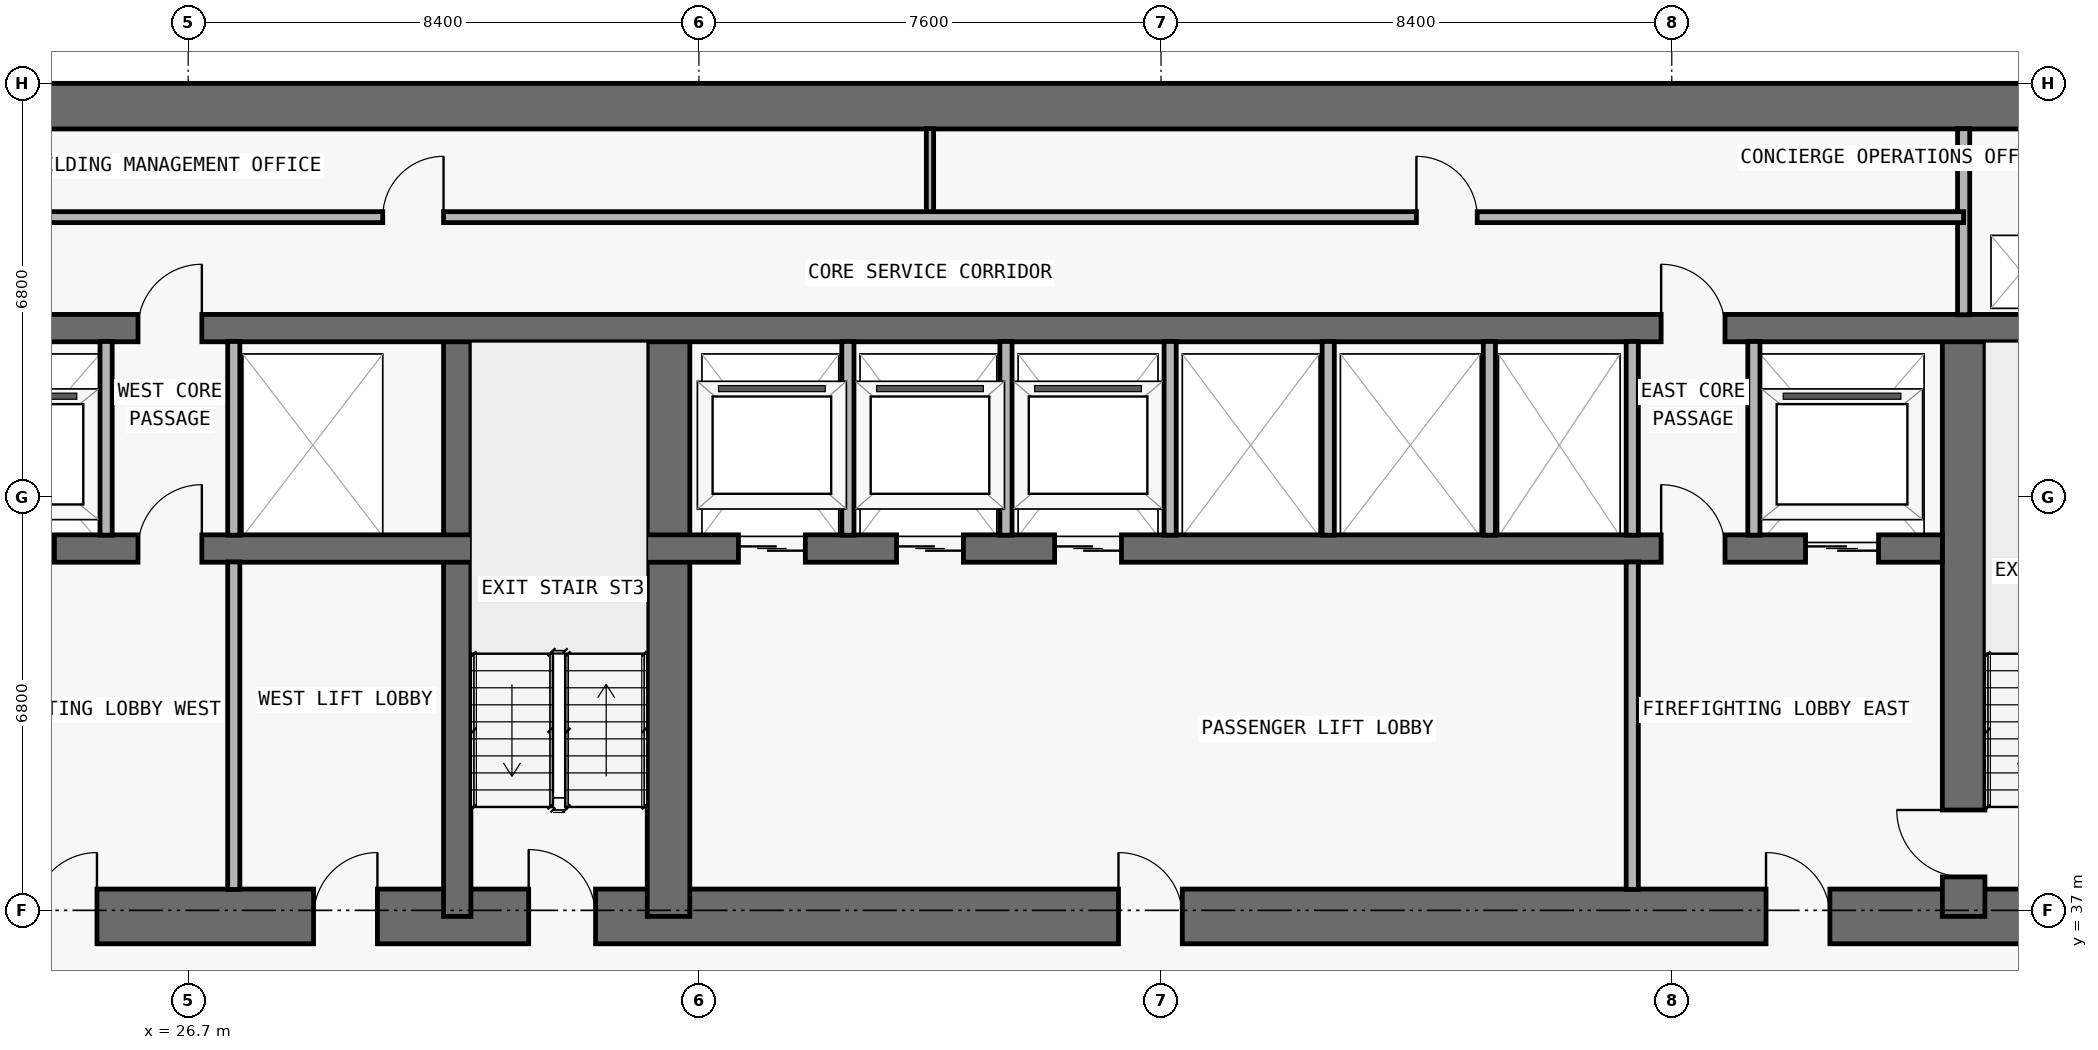
"""IFC4 building model, lengths in metres.
Left out: names, types, materials, properties, quantities, classifications, styles, units other than length and angle.
Written with IfcOpenShell. Run it as: python <this file> out.ifc"""

import sys

from ifc_helpers import new_model, si_unit, direction, frame, frame_2d, origin, place, context, subcontext, project, spatial, rectangle, extrude, element, fill, save


model = new_model("IFC4")
c1 = context("Model", 3, precision=1e-05, world=origin(), true_north=direction((0.0, 1.0)))
c2 = subcontext(c1, "Body", "Model", "MODEL_VIEW")
j1 = project(units=[si_unit("LENGTHUNIT", "METRE"), si_unit("PLANEANGLEUNIT", "RADIAN")], contexts=[c1])
p1 = place(None, origin())
s1 = spatial("IfcSite", under=j1, at=p1, CompositionType="ELEMENT")
p2 = place(p1, origin())
s2 = spatial("IfcBuilding", under=s1, at=p2, CompositionType="ELEMENT")
p3 = place(p2, frame((0.0, 0.0, 53.1)))
s3 = spatial("IfcBuildingStorey", under=s2, at=p3, CompositionType="ELEMENT", Elevation=53.1)
p4 = place(p3, frame((17.75, 36.9, 0.0), z_axis=(0.0, 0.0, 1.0), x_axis=(1.0, 0.0, 0.0)))
e1 = element("IfcWall", 1, at=p4, inside=s3, PredefinedType="SHEAR", context=c2, shape_type="SweptSolid", body=[
    extrude(rectangle(XDim=42.3, YDim=0.9, at=frame_2d((21.15, 0.0))), origin(), (0.0, 0.0, 1.0), 3.05),
])
p5 = place(p4, frame((14.55, 0.0, 0.0)))
e2 = element("IfcOpeningElement", 2, at=p5, cuts=e1, PredefinedType="OPENING", context=c2, shape_type="SweptSolid", body=[
    extrude(rectangle(XDim=1.1, YDim=2.15, at=frame_2d((0.55, 1.075))), frame((0.0, 0.46, 0.0), z_axis=(0.0, -1.0, 0.0), x_axis=(1.0, 0.0, 0.0)), (0.0, 0.0, 1.0), 0.92),
])
p6 = place(p4, frame((6.4, 0.0, 0.0)))
e3 = element("IfcOpeningElement", 3, at=p6, cuts=e1, PredefinedType="OPENING", context=c2, shape_type="SweptSolid", body=[
    extrude(rectangle(XDim=1.05, YDim=2.15, at=frame_2d((0.525, 1.075))), frame((0.0, 0.46, 0.0), z_axis=(0.0, -1.0, 0.0), x_axis=(1.0, 0.0, 0.0)), (0.0, 0.0, 1.0), 0.92),
])
p7 = place(p4, frame((34.9, 0.0, 0.0)))
e4 = element("IfcOpeningElement", 4, at=p7, cuts=e1, PredefinedType="OPENING", context=c2, shape_type="SweptSolid", body=[
    extrude(rectangle(XDim=1.05, YDim=2.15, at=frame_2d((0.525, 1.075))), frame((0.0, 0.46, 0.0), z_axis=(0.0, -1.0, 0.0), x_axis=(1.0, 0.0, 0.0)), (0.0, 0.0, 1.0), 0.92),
])
p8 = place(p4, frame((11.012, 0.0, 0.0)))
e5 = element("IfcOpeningElement", 5, at=p8, cuts=e1, PredefinedType="OPENING", context=c2, shape_type="SweptSolid", body=[
    extrude(rectangle(XDim=1.05, YDim=2.15, at=frame_2d((0.525, 1.075))), frame((0.0, 0.46, 0.0), z_axis=(0.0, -1.0, 0.0), x_axis=(1.0, 0.0, 0.0)), (0.0, 0.0, 1.0), 0.92),
])
p9 = place(p4, frame((24.25, 0.0, 0.0)))
e6 = element("IfcOpeningElement", 6, at=p9, cuts=e1, PredefinedType="OPENING", context=c2, shape_type="SweptSolid", body=[
    extrude(rectangle(XDim=1.05, YDim=2.15, at=frame_2d((0.525, 1.075))), frame((0.0, 0.46, 0.0), z_axis=(0.0, -1.0, 0.0), x_axis=(1.0, 0.0, 0.0)), (0.0, 0.0, 1.0), 0.92),
])
p10 = place(p3, frame((17.75, 50.225, 0.0), z_axis=(0.0, 0.0, 1.0), x_axis=(1.0, 0.0, 0.0)))
e7 = element("IfcWall", 7, at=p10, inside=s3, PredefinedType="SHEAR", context=c2, shape_type="SweptSolid", body=[
    extrude(rectangle(XDim=42.3, YDim=0.75, at=frame_2d((21.15, 0.0))), origin(), (0.0, 0.0, 1.0), 3.05),
])
p11 = place(p3, frame((55.9, 36.9, 0.0), z_axis=(0.0, 0.0, 1.0), x_axis=(0.0, 1.0, 0.0)))
e8 = element("IfcWall", 8, at=p11, inside=s3, PredefinedType="SHEAR", context=c2, shape_type="SweptSolid", body=[
    extrude(rectangle(XDim=9.675, YDim=0.7, at=frame_2d((4.837, 0.0))), origin(), (0.0, 0.0, 1.0), 3.05),
])
p12 = place(p11, frame((0.65, 0.0, 0.0)))
e9 = element("IfcOpeningElement", 9, at=p12, cuts=e8, PredefinedType="OPENING", context=c2, shape_type="SweptSolid", body=[
    extrude(rectangle(XDim=1.1, YDim=2.15, at=frame_2d((0.55, 1.075))), frame((0.0, 0.36, 0.0), z_axis=(0.0, -1.0, 0.0), x_axis=(1.0, 0.0, 0.0)), (0.0, 0.0, 1.0), 0.72),
])
p13 = place(p3, frame((31.125, 36.9, 0.0), z_axis=(0.0, 0.0, 1.0), x_axis=(0.0, 1.0, 0.0)))
e10 = element("IfcWall", 10, at=p13, inside=s3, PredefinedType="SHEAR", context=c2, shape_type="SweptSolid", body=[
    extrude(rectangle(XDim=9.675, YDim=0.45, at=frame_2d((4.837, 0.0))), origin(), (0.0, 0.0, 1.0), 3.05),
])
p14 = place(p3, frame((34.6, 36.9, 0.0), z_axis=(0.0, 0.0, 1.0), x_axis=(0.0, 1.0, 0.0)))
e11 = element("IfcWall", 11, at=p14, inside=s3, PredefinedType="SHEAR", context=c2, shape_type="SweptSolid", body=[
    extrude(rectangle(XDim=9.675, YDim=0.7, at=frame_2d((4.837, 0.0))), origin(), (0.0, 0.0, 1.0), 3.05),
])
p15 = place(p3, frame((22.25, 42.95, 0.0), z_axis=(0.0, 0.0, 1.0), x_axis=(1.0, 0.0, 0.0)))
e12 = element("IfcWall", 12, at=p15, inside=s3, PredefinedType="SHEAR", context=c2, shape_type="SweptSolid", body=[
    extrude(rectangle(XDim=33.3, YDim=0.45, at=frame_2d((16.65, 0.0))), origin(), (0.0, 0.0, 1.0), 3.05),
])
p16 = place(p15, frame((1.05, 0.0, 0.0)))
e13 = element("IfcOpeningElement", 13, at=p16, cuts=e12, PredefinedType="OPENING", context=c2, shape_type="SweptSolid", body=[
    extrude(rectangle(XDim=1.2, YDim=2.2, at=frame_2d((0.6, 1.1))), frame((0.0, 0.235, 0.0), z_axis=(0.0, -1.0, 0.0), x_axis=(1.0, 0.0, 0.0)), (0.0, 0.0, 1.0), 0.47),
])
p17 = place(p15, frame((31.05, 0.0, 0.0)))
e14 = element("IfcOpeningElement", 14, at=p17, cuts=e12, PredefinedType="OPENING", context=c2, shape_type="SweptSolid", body=[
    extrude(rectangle(XDim=1.2, YDim=2.2, at=frame_2d((0.6, 1.1))), frame((0.0, 0.235, 0.0), z_axis=(0.0, -1.0, 0.0), x_axis=(1.0, 0.0, 0.0)), (0.0, 0.0, 1.0), 0.47),
])
p18 = place(p15, frame((13.5, 0.0, 0.0)))
e15 = element("IfcOpeningElement", 15, at=p18, cuts=e12, PredefinedType="OPENING", context=c2, shape_type="SweptSolid", body=[
    extrude(rectangle(XDim=1.1, YDim=2.2, at=frame_2d((0.55, 1.1))), frame((0.0, 0.235, 0.0), z_axis=(0.0, -1.0, 0.0), x_axis=(1.0, 0.0, 0.0)), (0.0, 0.0, 1.0), 0.47),
])
p19 = place(p15, frame((16.1, 0.0, 0.0)))
e16 = element("IfcOpeningElement", 16, at=p19, cuts=e12, PredefinedType="OPENING", context=c2, shape_type="SweptSolid", body=[
    extrude(rectangle(XDim=1.1, YDim=2.2, at=frame_2d((0.55, 1.1))), frame((0.0, 0.235, 0.0), z_axis=(0.0, -1.0, 0.0), x_axis=(1.0, 0.0, 0.0)), (0.0, 0.0, 1.0), 0.47),
])
p20 = place(p15, frame((18.7, 0.0, 0.0)))
e17 = element("IfcOpeningElement", 17, at=p20, cuts=e12, PredefinedType="OPENING", context=c2, shape_type="SweptSolid", body=[
    extrude(rectangle(XDim=1.1, YDim=2.2, at=frame_2d((0.55, 1.1))), frame((0.0, 0.235, 0.0), z_axis=(0.0, -1.0, 0.0), x_axis=(1.0, 0.0, 0.0)), (0.0, 0.0, 1.0), 0.47),
])
p21 = place(p15, frame((3.625, 0.0, 0.0)))
e18 = element("IfcOpeningElement", 18, at=p21, cuts=e12, PredefinedType="OPENING", context=c2, shape_type="SweptSolid", body=[
    extrude(rectangle(XDim=1.05, YDim=2.15, at=frame_2d((0.525, 1.075))), frame((0.0, 0.235, 0.0), z_axis=(0.0, -1.0, 0.0), x_axis=(1.0, 0.0, 0.0)), (0.0, 0.0, 1.0), 0.47),
])
p22 = place(p15, frame((28.675, 0.0, 0.0)))
e19 = element("IfcOpeningElement", 19, at=p22, cuts=e12, PredefinedType="OPENING", context=c2, shape_type="SweptSolid", body=[
    extrude(rectangle(XDim=1.05, YDim=2.15, at=frame_2d((0.525, 1.075))), frame((0.0, 0.235, 0.0), z_axis=(0.0, -1.0, 0.0), x_axis=(1.0, 0.0, 0.0)), (0.0, 0.0, 1.0), 0.47),
])
p23 = place(p3, frame((18.2, 46.575, 0.0), z_axis=(0.0, 0.0, 1.0), x_axis=(1.0, 0.0, 0.0)))
e20 = element("IfcWall", 20, at=p23, inside=s3, PredefinedType="SHEAR", context=c2, shape_type="SweptSolid", body=[
    extrude(rectangle(XDim=41.4, YDim=0.45, at=frame_2d((20.7, 0.0))), origin(), (0.0, 0.0, 1.0), 3.05),
])
p24 = place(p23, frame((7.675, 0.0, 0.0)))
e21 = element("IfcOpeningElement", 21, at=p24, cuts=e20, PredefinedType="OPENING", context=c2, shape_type="SweptSolid", body=[
    extrude(rectangle(XDim=1.05, YDim=2.15, at=frame_2d((0.525, 1.075))), frame((0.0, 0.235, 0.0), z_axis=(0.0, -1.0, 0.0), x_axis=(1.0, 0.0, 0.0)), (0.0, 0.0, 1.0), 0.47),
])
p25 = place(p23, frame((32.725, 0.0, 0.0)))
e22 = element("IfcOpeningElement", 22, at=p25, cuts=e20, PredefinedType="OPENING", context=c2, shape_type="SweptSolid", body=[
    extrude(rectangle(XDim=1.05, YDim=2.15, at=frame_2d((0.525, 1.075))), frame((0.0, 0.235, 0.0), z_axis=(0.0, -1.0, 0.0), x_axis=(1.0, 0.0, 0.0)), (0.0, 0.0, 1.0), 0.47),
])
p26 = place(p3, frame((25.35, 43.17, 0.0), z_axis=(0.0, 0.0, 1.0), x_axis=(0.0, 1.0, 0.0)))
e23 = element("IfcWall", 23, at=p26, inside=s3, PredefinedType="PARTITIONING", context=c2, shape_type="SweptSolid", body=[
    extrude(rectangle(XDim=3.185, YDim=0.2, at=frame_2d((1.593, 0.0))), origin(), (0.0, 0.0, 1.0), 3.05),
])
p27 = place(p3, frame((27.45, 37.345, 0.0), z_axis=(0.0, 0.0, 1.0), x_axis=(0.0, 1.0, 0.0)))
e24 = element("IfcWall", 24, at=p27, inside=s3, PredefinedType="PARTITIONING", context=c2, shape_type="SweptSolid", body=[
    extrude(rectangle(XDim=5.385, YDim=0.2, at=frame_2d((2.692, 0.0))), origin(), (0.0, 0.0, 1.0), 3.05),
])
for number, where, z_axis, x_axis in (
    (25, (27.45, 43.17, 0.0), (0.0, 0.0, 1.0), (0.0, 1.0, 0.0)),
    (26, (37.55, 43.17, 0.0), (0.0, 0.0, 1.0), (0.0, 1.0, 0.0)),
):
    element("IfcWall", number, at=place(p3, frame(where, z_axis=z_axis, x_axis=x_axis)), inside=s3, PredefinedType="PARTITIONING", context=c2, shape_type="SweptSolid", body=[
        extrude(rectangle(XDim=3.185, YDim=0.2, at=frame_2d((1.593, 0.0))), origin(), (0.0, 0.0, 1.0), 3.05),
    ])
p28 = place(p3, frame((38.9, 48.4, 0.0), z_axis=(0.0, 0.0, 1.0), x_axis=(0.0, 1.0, 0.0)))
e27 = element("IfcWall", 27, at=p28, inside=s3, PredefinedType="PARTITIONING", context=c2, shape_type="SweptSolid", body=[
    extrude(rectangle(XDim=1.455, YDim=0.12, at=frame_2d((0.728, 0.0))), origin(), (0.0, 0.0, 1.0), 3.05),
])
for number, where, z_axis, x_axis in (
    (28, (40.15, 43.17, 0.0), (0.0, 0.0, 1.0), (0.0, 1.0, 0.0)),
    (29, (42.85, 43.17, 0.0), (0.0, 0.0, 1.0), (0.0, 1.0, 0.0)),
    (30, (45.45, 43.17, 0.0), (0.0, 0.0, 1.0), (0.0, 1.0, 0.0)),
    (31, (48.1, 43.17, 0.0), (0.0, 0.0, 1.0), (0.0, 1.0, 0.0)),
):
    element("IfcWall", number, at=place(p3, frame(where, z_axis=z_axis, x_axis=x_axis)), inside=s3, PredefinedType="PARTITIONING", context=c2, shape_type="SweptSolid", body=[
        extrude(rectangle(XDim=3.185, YDim=0.2, at=frame_2d((1.593, 0.0))), origin(), (0.0, 0.0, 1.0), 3.05),
    ])
p29 = place(p3, frame((50.45, 37.345, 0.0), z_axis=(0.0, 0.0, 1.0), x_axis=(0.0, 1.0, 0.0)))
e32 = element("IfcWall", 32, at=p29, inside=s3, PredefinedType="PARTITIONING", context=c2, shape_type="SweptSolid", body=[
    extrude(rectangle(XDim=5.385, YDim=0.2, at=frame_2d((2.692, 0.0))), origin(), (0.0, 0.0, 1.0), 3.05),
])
for number, where, z_axis, x_axis in (
    (33, (50.45, 43.17, 0.0), (0.0, 0.0, 1.0), (0.0, 1.0, 0.0)),
    (34, (52.45, 43.17, 0.0), (0.0, 0.0, 1.0), (0.0, 1.0, 0.0)),
):
    element("IfcWall", number, at=place(p3, frame(where, z_axis=z_axis, x_axis=x_axis)), inside=s3, PredefinedType="PARTITIONING", context=c2, shape_type="SweptSolid", body=[
        extrude(rectangle(XDim=3.185, YDim=0.2, at=frame_2d((1.593, 0.0))), origin(), (0.0, 0.0, 1.0), 3.05),
    ])
p30 = place(p3, frame((55.9, 46.795, 0.0), z_axis=(0.0, 0.0, 1.0), x_axis=(0.0, 1.0, 0.0)))
e35 = element("IfcWall", 35, at=p30, inside=s3, PredefinedType="PARTITIONING", context=c2, shape_type="SweptSolid", body=[
    extrude(rectangle(XDim=3.06, YDim=0.2, at=frame_2d((1.53, 0.0))), origin(), (0.0, 0.0, 1.0), 3.05),
])
p31 = place(p3, frame((21.9, 48.4, 0.0), z_axis=(0.0, 0.0, 1.0), x_axis=(1.0, 0.0, 0.0)))
e36 = element("IfcWall", 36, at=p31, inside=s3, PredefinedType="PARTITIONING", context=c2, shape_type="SweptSolid", body=[
    extrude(rectangle(XDim=34.0, YDim=0.18, at=frame_2d((17.0, 0.0))), origin(), (0.0, 0.0, 1.0), 3.05),
])
p32 = place(p31, frame((8.0, 0.0, 0.0)))
e37 = element("IfcOpeningElement", 37, at=p32, cuts=e36, PredefinedType="OPENING", context=c2, shape_type="SweptSolid", body=[
    extrude(rectangle(XDim=1.0, YDim=2.2, at=frame_2d((0.5, 1.1))), frame((0.0, 0.1, 0.0), z_axis=(0.0, -1.0, 0.0), x_axis=(1.0, 0.0, 0.0)), (0.0, 0.0, 1.0), 0.2),
])
p33 = place(p31, frame((25.0, 0.0, 0.0)))
e38 = element("IfcOpeningElement", 38, at=p33, cuts=e36, PredefinedType="OPENING", context=c2, shape_type="SweptSolid", body=[
    extrude(rectangle(XDim=1.0, YDim=2.2, at=frame_2d((0.5, 1.1))), frame((0.0, 0.1, 0.0), z_axis=(0.0, -1.0, 0.0), x_axis=(1.0, 0.0, 0.0)), (0.0, 0.0, 1.0), 0.2),
])
p34 = place(p16, origin())
e39 = element("IfcDoor", 39, at=p34, inside=s3, OperationType="DOUBLE_DOOR_SLIDING", PredefinedType="DOOR", context=c2, shape_type="SweptSolid", body=[
    extrude(rectangle(XDim=1.2, YDim=2.2, at=frame_2d((0.6, 1.1))), frame((0.0, 0.025, 0.0), z_axis=(0.0, -1.0, 0.0), x_axis=(1.0, 0.0, 0.0)), (0.0, 0.0, 1.0), 0.05),
])
fill(e13, e39)
p35 = place(p17, origin())
e40 = element("IfcDoor", 40, at=p35, inside=s3, OperationType="DOUBLE_DOOR_SLIDING", PredefinedType="DOOR", context=c2, shape_type="SweptSolid", body=[
    extrude(rectangle(XDim=1.2, YDim=2.2, at=frame_2d((0.6, 1.1))), frame((0.0, 0.025, 0.0), z_axis=(0.0, -1.0, 0.0), x_axis=(1.0, 0.0, 0.0)), (0.0, 0.0, 1.0), 0.05),
])
fill(e14, e40)
p36 = place(p18, origin())
e41 = element("IfcDoor", 41, at=p36, inside=s3, OperationType="DOUBLE_DOOR_SLIDING", PredefinedType="DOOR", context=c2, shape_type="SweptSolid", body=[
    extrude(rectangle(XDim=1.1, YDim=2.2, at=frame_2d((0.55, 1.1))), frame((0.0, 0.025, 0.0), z_axis=(0.0, -1.0, 0.0), x_axis=(1.0, 0.0, 0.0)), (0.0, 0.0, 1.0), 0.05),
])
fill(e15, e41)
p37 = place(p19, origin())
e42 = element("IfcDoor", 42, at=p37, inside=s3, OperationType="DOUBLE_DOOR_SLIDING", PredefinedType="DOOR", context=c2, shape_type="SweptSolid", body=[
    extrude(rectangle(XDim=1.1, YDim=2.2, at=frame_2d((0.55, 1.1))), frame((0.0, 0.025, 0.0), z_axis=(0.0, -1.0, 0.0), x_axis=(1.0, 0.0, 0.0)), (0.0, 0.0, 1.0), 0.05),
])
fill(e16, e42)
p38 = place(p20, origin())
e43 = element("IfcDoor", 43, at=p38, inside=s3, OperationType="DOUBLE_DOOR_SLIDING", PredefinedType="DOOR", context=c2, shape_type="SweptSolid", body=[
    extrude(rectangle(XDim=1.1, YDim=2.2, at=frame_2d((0.55, 1.1))), frame((0.0, 0.025, 0.0), z_axis=(0.0, -1.0, 0.0), x_axis=(1.0, 0.0, 0.0)), (0.0, 0.0, 1.0), 0.05),
])
fill(e17, e43)
p39 = place(p5, origin())
e44 = element("IfcDoor", 44, at=p39, inside=s3, OperationType="SINGLE_SWING_LEFT", PredefinedType="DOOR", context=c2, shape_type="SweptSolid", body=[
    extrude(rectangle(XDim=1.1, YDim=2.15, at=frame_2d((0.55, 1.075))), frame((0.0, 0.025, 0.0), z_axis=(0.0, -1.0, 0.0), x_axis=(1.0, 0.0, 0.0)), (0.0, 0.0, 1.0), 0.05),
])
fill(e2, e44)
p40 = place(p6, origin())
e45 = element("IfcDoor", 45, at=p40, inside=s3, OperationType="SINGLE_SWING_RIGHT", PredefinedType="DOOR", context=c2, shape_type="SweptSolid", body=[
    extrude(rectangle(XDim=1.05, YDim=2.15, at=frame_2d((0.525, 1.075))), frame((0.0, 0.025, 0.0), z_axis=(0.0, -1.0, 0.0), x_axis=(1.0, 0.0, 0.0)), (0.0, 0.0, 1.0), 0.05),
])
fill(e3, e45)
p41 = place(p21, origin())
e46 = element("IfcDoor", 46, at=p41, inside=s3, OperationType="SINGLE_SWING_RIGHT", PredefinedType="DOOR", context=c2, shape_type="SweptSolid", body=[
    extrude(rectangle(XDim=1.05, YDim=2.15, at=frame_2d((0.525, 1.075))), frame((0.0, 0.025, 0.0), z_axis=(0.0, -1.0, 0.0), x_axis=(1.0, 0.0, 0.0)), (0.0, 0.0, 1.0), 0.05),
])
fill(e18, e46)
p42 = place(p7, origin())
e47 = element("IfcDoor", 47, at=p42, inside=s3, OperationType="SINGLE_SWING_LEFT", PredefinedType="DOOR", context=c2, shape_type="SweptSolid", body=[
    extrude(rectangle(XDim=1.05, YDim=2.15, at=frame_2d((0.525, 1.075))), frame((0.0, 0.025, 0.0), z_axis=(0.0, -1.0, 0.0), x_axis=(1.0, 0.0, 0.0)), (0.0, 0.0, 1.0), 0.05),
])
fill(e4, e47)
p43 = place(p12, origin())
e48 = element("IfcDoor", 48, at=p43, inside=s3, OperationType="SINGLE_SWING_RIGHT", PredefinedType="DOOR", context=c2, shape_type="SweptSolid", body=[
    extrude(rectangle(XDim=1.1, YDim=2.15, at=frame_2d((0.55, 1.075))), frame((0.0, 0.025, 0.0), z_axis=(0.0, -1.0, 0.0), x_axis=(1.0, 0.0, 0.0)), (0.0, 0.0, 1.0), 0.05),
])
fill(e9, e48)
p44 = place(p22, origin())
e49 = element("IfcDoor", 49, at=p44, inside=s3, OperationType="SINGLE_SWING_LEFT", PredefinedType="DOOR", context=c2, shape_type="SweptSolid", body=[
    extrude(rectangle(XDim=1.05, YDim=2.15, at=frame_2d((0.525, 1.075))), frame((0.0, 0.025, 0.0), z_axis=(0.0, -1.0, 0.0), x_axis=(1.0, 0.0, 0.0)), (0.0, 0.0, 1.0), 0.05),
])
fill(e19, e49)
p45 = place(p8, origin())
e50 = element("IfcDoor", 50, at=p45, inside=s3, OperationType="SINGLE_SWING_RIGHT", PredefinedType="DOOR", context=c2, shape_type="SweptSolid", body=[
    extrude(rectangle(XDim=1.05, YDim=2.15, at=frame_2d((0.525, 1.075))), frame((0.0, 0.025, 0.0), z_axis=(0.0, -1.0, 0.0), x_axis=(1.0, 0.0, 0.0)), (0.0, 0.0, 1.0), 0.05),
])
fill(e5, e50)
p46 = place(p9, origin())
e51 = element("IfcDoor", 51, at=p46, inside=s3, OperationType="SINGLE_SWING_LEFT", PredefinedType="DOOR", context=c2, shape_type="SweptSolid", body=[
    extrude(rectangle(XDim=1.05, YDim=2.15, at=frame_2d((0.525, 1.075))), frame((0.0, 0.025, 0.0), z_axis=(0.0, -1.0, 0.0), x_axis=(1.0, 0.0, 0.0)), (0.0, 0.0, 1.0), 0.05),
])
fill(e6, e51)
p47 = place(p24, origin())
e52 = element("IfcDoor", 52, at=p47, inside=s3, OperationType="SINGLE_SWING_RIGHT", PredefinedType="DOOR", context=c2, shape_type="SweptSolid", body=[
    extrude(rectangle(XDim=1.05, YDim=2.15, at=frame_2d((0.525, 1.075))), frame((0.0, 0.025, 0.0), z_axis=(0.0, -1.0, 0.0), x_axis=(1.0, 0.0, 0.0)), (0.0, 0.0, 1.0), 0.05),
])
fill(e21, e52)
p48 = place(p25, origin())
e53 = element("IfcDoor", 53, at=p48, inside=s3, OperationType="SINGLE_SWING_LEFT", PredefinedType="DOOR", context=c2, shape_type="SweptSolid", body=[
    extrude(rectangle(XDim=1.05, YDim=2.15, at=frame_2d((0.525, 1.075))), frame((0.0, 0.025, 0.0), z_axis=(0.0, -1.0, 0.0), x_axis=(1.0, 0.0, 0.0)), (0.0, 0.0, 1.0), 0.05),
])
fill(e22, e53)
p49 = place(p32, origin())
e54 = element("IfcDoor", 54, at=p49, inside=s3, OperationType="SINGLE_SWING_RIGHT", PredefinedType="DOOR", context=c2, shape_type="SweptSolid", body=[
    extrude(rectangle(XDim=1.0, YDim=2.2, at=frame_2d((0.5, 1.1))), frame((0.0, 0.025, 0.0), z_axis=(0.0, -1.0, 0.0), x_axis=(1.0, 0.0, 0.0)), (0.0, 0.0, 1.0), 0.05),
])
fill(e37, e54)
p50 = place(p33, origin())
e55 = element("IfcDoor", 55, at=p50, inside=s3, OperationType="SINGLE_SWING_LEFT", PredefinedType="DOOR", context=c2, shape_type="SweptSolid", body=[
    extrude(rectangle(XDim=1.0, YDim=2.2, at=frame_2d((0.5, 1.1))), frame((0.0, 0.025, 0.0), z_axis=(0.0, -1.0, 0.0), x_axis=(1.0, 0.0, 0.0)), (0.0, 0.0, 1.0), 0.05),
])
fill(e38, e55)
save(model, sys.argv[1])
